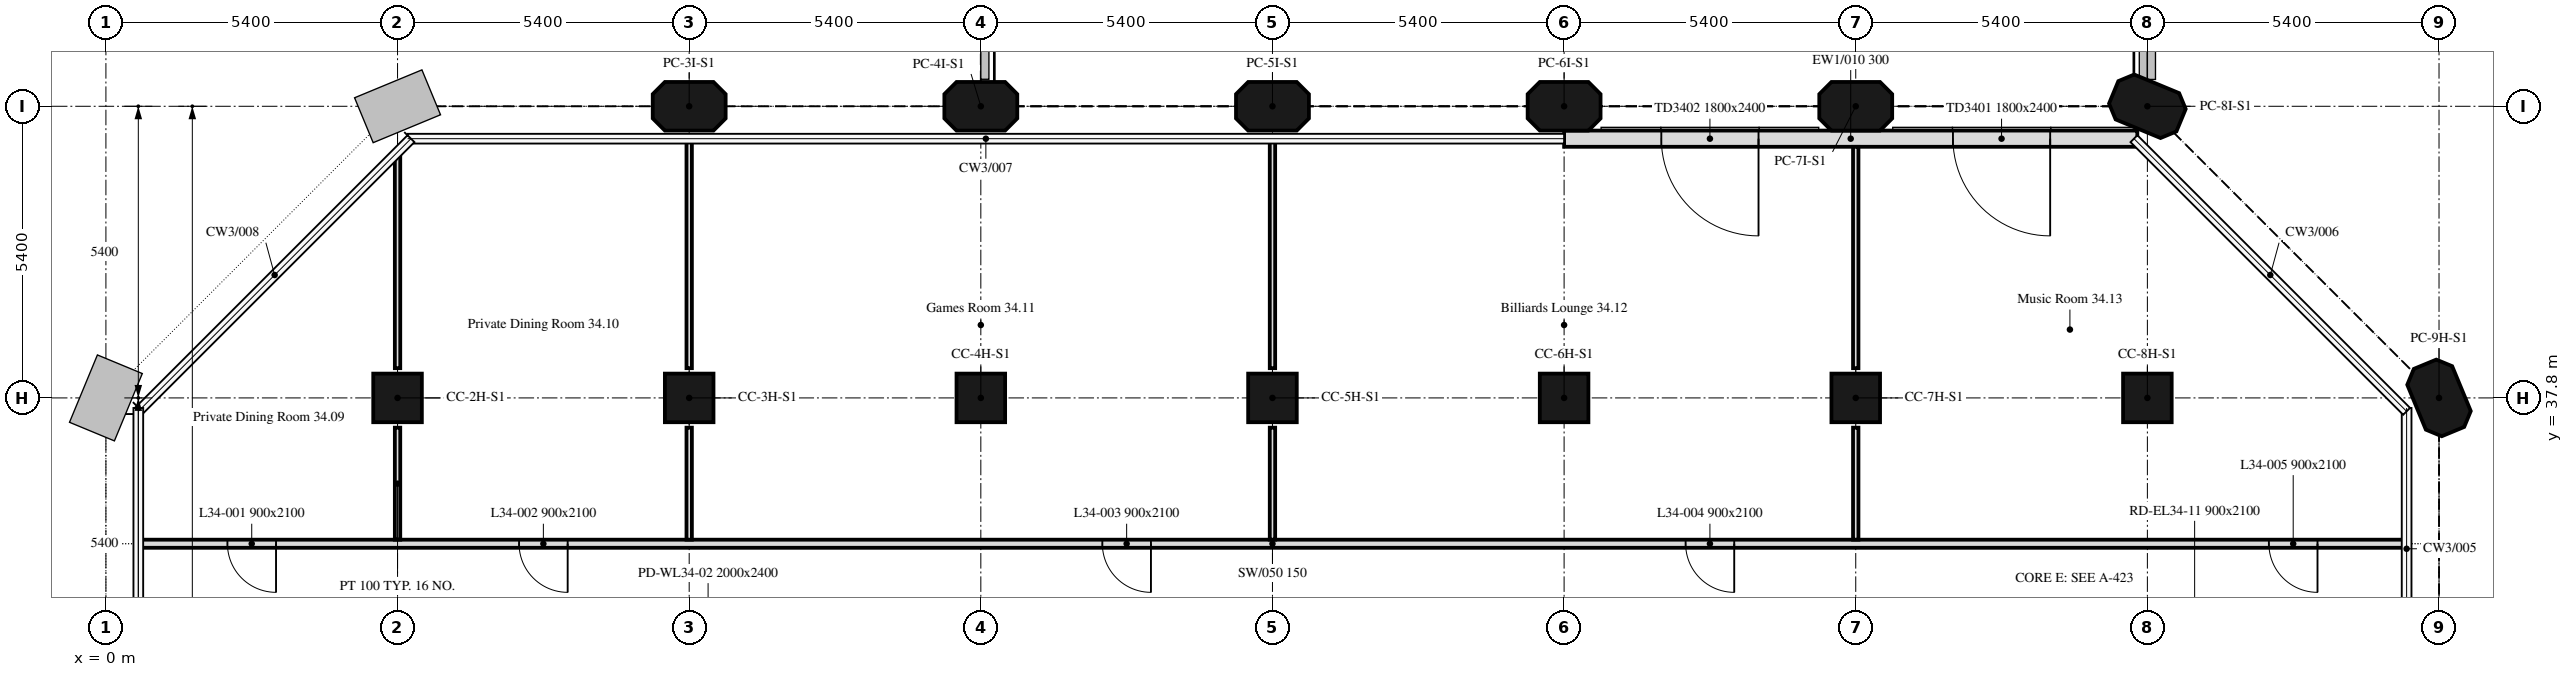
"""IFC4 building model, lengths in metres.
Left out: names, types, materials, properties, quantities, classifications, styles, units other than length and angle.
Written with IfcOpenShell. Run it as: python <this file> out.ifc"""

import sys

from ifc_helpers import new_model, si_unit, direction, frame, frame_2d, origin, origin_2d, place, context, subcontext, project, spatial, polyline, rectangle, outline, extrude, element, fill, save


model = new_model("IFC4")
c1 = context("Model", 3, precision=1e-05, world=origin(), true_north=direction((0.0, 1.0)))
c2 = subcontext(c1, "Body", "Model", "MODEL_VIEW")
j1 = project(units=[si_unit("LENGTHUNIT", "METRE"), si_unit("PLANEANGLEUNIT", "RADIAN")], contexts=[c1])
p1 = place(None, origin())
s1 = spatial("IfcSite", under=j1, at=p1, CompositionType="ELEMENT")
p2 = place(p1, origin())
s2 = spatial("IfcBuilding", under=s1, at=p2, CompositionType="ELEMENT")
p3 = place(p2, frame((0.0, 0.0, 148.0)))
s3 = spatial("IfcBuildingStorey", under=s2, at=p3, CompositionType="ELEMENT", Elevation=148.0)
for number, where, z_axis, x_axis in (
    (1, (5.4, 37.8, 0.0), (0.0, 0.0, 1.0), (1.0, 0.0, 0.0)),
    (2, (10.8, 37.8, 0.0), (0.0, 0.0, 1.0), (1.0, 0.0, 0.0)),
    (3, (16.2, 37.8, 0.0), (0.0, 0.0, 1.0), (1.0, 0.0, 0.0)),
    (4, (21.6, 37.8, 0.0), (0.0, 0.0, 1.0), (1.0, 0.0, 0.0)),
    (5, (27.0, 37.8, 0.0), (0.0, 0.0, 1.0), (1.0, 0.0, 0.0)),
    (6, (32.4, 37.8, 0.0), (0.0, 0.0, 1.0), (1.0, 0.0, 0.0)),
    (7, (37.8, 37.8, 0.0), (0.0, 0.0, 1.0), (1.0, 0.0, 0.0)),
):
    element("IfcColumn", number, at=place(p3, frame(where, z_axis=z_axis, x_axis=x_axis)), inside=s3, PredefinedType="COLUMN", context=c2, shape_type="SweptSolid", body=[
        extrude(rectangle(XDim=0.9, YDim=0.9, at=origin_2d()), origin(), (0.0, 0.0, 1.0), 4.5),
    ])
for number, where, z_axis, x_axis in (
    (8, (43.2, 37.8, 0.0), (0.0, 0.0, 1.0), (-0.383, 0.924, 0.0)),
    (9, (10.8, 43.2, 0.0), (0.0, 0.0, 1.0), (1.0, 0.0, 0.0)),
    (10, (16.2, 43.2, 0.0), (0.0, 0.0, 1.0), (1.0, 0.0, 0.0)),
    (11, (21.6, 43.2, 0.0), (0.0, 0.0, 1.0), (1.0, 0.0, 0.0)),
    (12, (27.0, 43.2, 0.0), (0.0, 0.0, 1.0), (1.0, 0.0, 0.0)),
    (13, (32.4, 43.2, 0.0), (0.0, 0.0, 1.0), (1.0, 0.0, 0.0)),
    (14, (37.8, 43.2, 0.0), (0.0, 0.0, 1.0), (-0.924, 0.383, 0.0)),
):
    element("IfcColumn", number, at=place(p3, frame(where, z_axis=z_axis, x_axis=x_axis)), inside=s3, PredefinedType="COLUMN", context=c2, shape_type="SweptSolid", body=[
        extrude(outline(polyline([(-0.45, -0.45), (0.45, -0.45), (0.675, -0.225), (0.675, 0.225), (0.45, 0.45), (-0.45, 0.45), (-0.675, 0.225), (-0.675, -0.225), (-0.45, -0.45)])), origin(), (0.0, 0.0, 1.0), 4.5),
    ])
p4 = place(p3, frame((37.614, 42.6, 0.0), z_axis=(0.0, 0.0, 1.0), x_axis=(-1.0, 0.0, 0.0)))
e15 = element("IfcWall", 15, at=p4, inside=s3, PredefinedType="SOLIDWALL", context=c2, shape_type="SweptSolid", body=[
    extrude(rectangle(XDim=10.614, YDim=0.3, at=frame_2d((5.307, 0.0))), origin(), (0.0, 0.0, 1.0), 4.5),
])
p5 = place(p4, frame((1.614, 0.0, 0.0)))
e16 = element("IfcOpeningElement", 16, at=p5, cuts=e15, PredefinedType="OPENING", context=c2, shape_type="SweptSolid", body=[
    extrude(rectangle(XDim=1.8, YDim=2.4, at=frame_2d((0.9, 1.2))), frame((0.0, 0.16, 0.0), z_axis=(0.0, -1.0, 0.0), x_axis=(1.0, 0.0, 0.0)), (0.0, 0.0, 1.0), 0.32),
])
p6 = place(p4, frame((7.014, 0.0, 0.0)))
e17 = element("IfcOpeningElement", 17, at=p6, cuts=e15, PredefinedType="OPENING", context=c2, shape_type="SweptSolid", body=[
    extrude(rectangle(XDim=1.8, YDim=2.4, at=frame_2d((0.9, 1.2))), frame((0.0, 0.16, 0.0), z_axis=(0.0, -1.0, 0.0), x_axis=(1.0, 0.0, 0.0)), (0.0, 0.0, 1.0), 0.32),
])
p7 = place(p3, frame((42.6, 35.1, 0.0), z_axis=(0.0, 0.0, 1.0), x_axis=(-1.0, 0.0, 0.0)))
e18 = element("IfcWall", 18, at=p7, inside=s3, PredefinedType="PARTITIONING", context=c2, shape_type="SweptSolid", body=[
    extrude(rectangle(XDim=42.0, YDim=0.15, at=frame_2d((21.0, 0.0))), origin(), (0.0, 0.0, 1.0), 4.5),
])
p8 = place(p7, frame((39.45, 0.0, 0.0)))
e19 = element("IfcOpeningElement", 19, at=p8, cuts=e18, PredefinedType="OPENING", context=c2, shape_type="SweptSolid", body=[
    extrude(rectangle(XDim=0.9, YDim=2.1, at=frame_2d((0.45, 1.05))), frame((0.0, 0.075, 0.0), z_axis=(0.0, -1.0, 0.0), x_axis=(1.0, 0.0, 0.0)), (0.0, 0.0, 1.0), 0.15),
])
p9 = place(p7, frame((34.05, 0.0, 0.0)))
e20 = element("IfcOpeningElement", 20, at=p9, cuts=e18, PredefinedType="OPENING", context=c2, shape_type="SweptSolid", body=[
    extrude(rectangle(XDim=0.9, YDim=2.1, at=frame_2d((0.45, 1.05))), frame((0.0, 0.075, 0.0), z_axis=(0.0, -1.0, 0.0), x_axis=(1.0, 0.0, 0.0)), (0.0, 0.0, 1.0), 0.15),
])
p10 = place(p7, frame((23.25, 0.0, 0.0)))
e21 = element("IfcOpeningElement", 21, at=p10, cuts=e18, PredefinedType="OPENING", context=c2, shape_type="SweptSolid", body=[
    extrude(rectangle(XDim=0.9, YDim=2.1, at=frame_2d((0.45, 1.05))), frame((0.0, 0.075, 0.0), z_axis=(0.0, -1.0, 0.0), x_axis=(1.0, 0.0, 0.0)), (0.0, 0.0, 1.0), 0.15),
])
p11 = place(p7, frame((12.45, 0.0, 0.0)))
e22 = element("IfcOpeningElement", 22, at=p11, cuts=e18, PredefinedType="OPENING", context=c2, shape_type="SweptSolid", body=[
    extrude(rectangle(XDim=0.9, YDim=2.1, at=frame_2d((0.45, 1.05))), frame((0.0, 0.075, 0.0), z_axis=(0.0, -1.0, 0.0), x_axis=(1.0, 0.0, 0.0)), (0.0, 0.0, 1.0), 0.15),
])
p12 = place(p7, frame((1.65, 0.0, 0.0)))
e23 = element("IfcOpeningElement", 23, at=p12, cuts=e18, PredefinedType="OPENING", context=c2, shape_type="SweptSolid", body=[
    extrude(rectangle(XDim=0.9, YDim=2.1, at=frame_2d((0.45, 1.05))), frame((0.0, 0.075, 0.0), z_axis=(0.0, -1.0, 0.0), x_axis=(1.0, 0.0, 0.0)), (0.0, 0.0, 1.0), 0.15),
])
p13 = place(p3, frame((5.4, 35.175, 0.0), z_axis=(0.0, 0.0, 1.0), x_axis=(0.0, 1.0, 0.0)))
e24 = element("IfcWall", 24, at=p13, inside=s3, PredefinedType="PARTITIONING", context=c2, shape_type="SweptSolid", body=[
    extrude(rectangle(XDim=2.074, YDim=0.1, at=frame_2d((1.037, 0.0))), origin(), (0.0, 0.0, 1.0), 4.5),
])
p14 = place(p3, frame((5.4, 38.351, 0.0), z_axis=(0.0, 0.0, 1.0), x_axis=(0.0, 1.0, 0.0)))
e25 = element("IfcWall", 25, at=p14, inside=s3, PredefinedType="PARTITIONING", context=c2, shape_type="SweptSolid", body=[
    extrude(rectangle(XDim=3.951, YDim=0.1, at=frame_2d((1.976, 0.0))), origin(), (0.0, 0.0, 1.0), 4.5),
])
p15 = place(p3, frame((10.8, 35.175, 0.0), z_axis=(0.0, 0.0, 1.0), x_axis=(0.0, 1.0, 0.0)))
e26 = element("IfcWall", 26, at=p15, inside=s3, PredefinedType="PARTITIONING", context=c2, shape_type="SweptSolid", body=[
    extrude(rectangle(XDim=2.074, YDim=0.1, at=frame_2d((1.037, 0.0))), origin(), (0.0, 0.0, 1.0), 4.5),
])
p16 = place(p3, frame((10.8, 38.351, 0.0), z_axis=(0.0, 0.0, 1.0), x_axis=(0.0, 1.0, 0.0)))
e27 = element("IfcWall", 27, at=p16, inside=s3, PredefinedType="PARTITIONING", context=c2, shape_type="SweptSolid", body=[
    extrude(rectangle(XDim=4.25, YDim=0.1, at=frame_2d((2.125, 0.0))), origin(), (0.0, 0.0, 1.0), 4.5),
])
p17 = place(p3, frame((21.6, 35.175, 0.0), z_axis=(0.0, 0.0, 1.0), x_axis=(0.0, 1.0, 0.0)))
e28 = element("IfcWall", 28, at=p17, inside=s3, PredefinedType="PARTITIONING", context=c2, shape_type="SweptSolid", body=[
    extrude(rectangle(XDim=2.074, YDim=0.1, at=frame_2d((1.037, 0.0))), origin(), (0.0, 0.0, 1.0), 4.5),
])
p18 = place(p3, frame((21.6, 38.351, 0.0), z_axis=(0.0, 0.0, 1.0), x_axis=(0.0, 1.0, 0.0)))
e29 = element("IfcWall", 29, at=p18, inside=s3, PredefinedType="PARTITIONING", context=c2, shape_type="SweptSolid", body=[
    extrude(rectangle(XDim=4.25, YDim=0.1, at=frame_2d((2.125, 0.0))), origin(), (0.0, 0.0, 1.0), 4.5),
])
p19 = place(p3, frame((32.4, 35.175, 0.0), z_axis=(0.0, 0.0, 1.0), x_axis=(0.0, 1.0, 0.0)))
e30 = element("IfcWall", 30, at=p19, inside=s3, PredefinedType="PARTITIONING", context=c2, shape_type="SweptSolid", body=[
    extrude(rectangle(XDim=2.074, YDim=0.1, at=frame_2d((1.037, 0.0))), origin(), (0.0, 0.0, 1.0), 4.5),
])
p20 = place(p3, frame((32.4, 38.351, 0.0), z_axis=(0.0, 0.0, 1.0), x_axis=(0.0, 1.0, 0.0)))
e31 = element("IfcWall", 31, at=p20, inside=s3, PredefinedType="PARTITIONING", context=c2, shape_type="SweptSolid", body=[
    extrude(rectangle(XDim=4.098, YDim=0.1, at=frame_2d((2.049, 0.0))), origin(), (0.0, 0.0, 1.0), 4.5),
])
p21 = place(p5, origin())
e32 = element("IfcDoor", 32, at=p21, inside=s3, OperationType="DOUBLE_DOOR_DOUBLE_SWING", PredefinedType="DOOR", context=c2, shape_type="SweptSolid", body=[
    extrude(rectangle(XDim=1.8, YDim=2.4, at=frame_2d((0.9, 1.2))), frame((0.0, 0.025, 0.0), z_axis=(0.0, -1.0, 0.0), x_axis=(1.0, 0.0, 0.0)), (0.0, 0.0, 1.0), 0.05),
])
fill(e16, e32)
p22 = place(p6, origin())
e33 = element("IfcDoor", 33, at=p22, inside=s3, OperationType="DOUBLE_DOOR_DOUBLE_SWING", PredefinedType="DOOR", context=c2, shape_type="SweptSolid", body=[
    extrude(rectangle(XDim=1.8, YDim=2.4, at=frame_2d((0.9, 1.2))), frame((0.0, 0.025, 0.0), z_axis=(0.0, -1.0, 0.0), x_axis=(1.0, 0.0, 0.0)), (0.0, 0.0, 1.0), 0.05),
])
fill(e17, e33)
p23 = place(p8, origin())
e34 = element("IfcDoor", 34, at=p23, inside=s3, OperationType="SINGLE_SWING_RIGHT", PredefinedType="DOOR", context=c2, shape_type="SweptSolid", body=[
    extrude(rectangle(XDim=0.9, YDim=2.1, at=frame_2d((0.45, 1.05))), frame((0.0, 0.025, 0.0), z_axis=(0.0, -1.0, 0.0), x_axis=(1.0, 0.0, 0.0)), (0.0, 0.0, 1.0), 0.05),
])
fill(e19, e34)
p24 = place(p9, origin())
e35 = element("IfcDoor", 35, at=p24, inside=s3, OperationType="SINGLE_SWING_RIGHT", PredefinedType="DOOR", context=c2, shape_type="SweptSolid", body=[
    extrude(rectangle(XDim=0.9, YDim=2.1, at=frame_2d((0.45, 1.05))), frame((0.0, 0.025, 0.0), z_axis=(0.0, -1.0, 0.0), x_axis=(1.0, 0.0, 0.0)), (0.0, 0.0, 1.0), 0.05),
])
fill(e20, e35)
p25 = place(p10, origin())
e36 = element("IfcDoor", 36, at=p25, inside=s3, OperationType="SINGLE_SWING_RIGHT", PredefinedType="DOOR", context=c2, shape_type="SweptSolid", body=[
    extrude(rectangle(XDim=0.9, YDim=2.1, at=frame_2d((0.45, 1.05))), frame((0.0, 0.025, 0.0), z_axis=(0.0, -1.0, 0.0), x_axis=(1.0, 0.0, 0.0)), (0.0, 0.0, 1.0), 0.05),
])
fill(e21, e36)
p26 = place(p11, origin())
e37 = element("IfcDoor", 37, at=p26, inside=s3, OperationType="SINGLE_SWING_LEFT", PredefinedType="DOOR", context=c2, shape_type="SweptSolid", body=[
    extrude(rectangle(XDim=0.9, YDim=2.1, at=frame_2d((0.45, 1.05))), frame((0.0, 0.025, 0.0), z_axis=(0.0, -1.0, 0.0), x_axis=(1.0, 0.0, 0.0)), (0.0, 0.0, 1.0), 0.05),
])
fill(e22, e37)
p27 = place(p12, origin())
e38 = element("IfcDoor", 38, at=p27, inside=s3, OperationType="SINGLE_SWING_LEFT", PredefinedType="DOOR", context=c2, shape_type="SweptSolid", body=[
    extrude(rectangle(XDim=0.9, YDim=2.1, at=frame_2d((0.45, 1.05))), frame((0.0, 0.025, 0.0), z_axis=(0.0, -1.0, 0.0), x_axis=(1.0, 0.0, 0.0)), (0.0, 0.0, 1.0), 0.05),
])
fill(e23, e38)
save(model, sys.argv[1])
